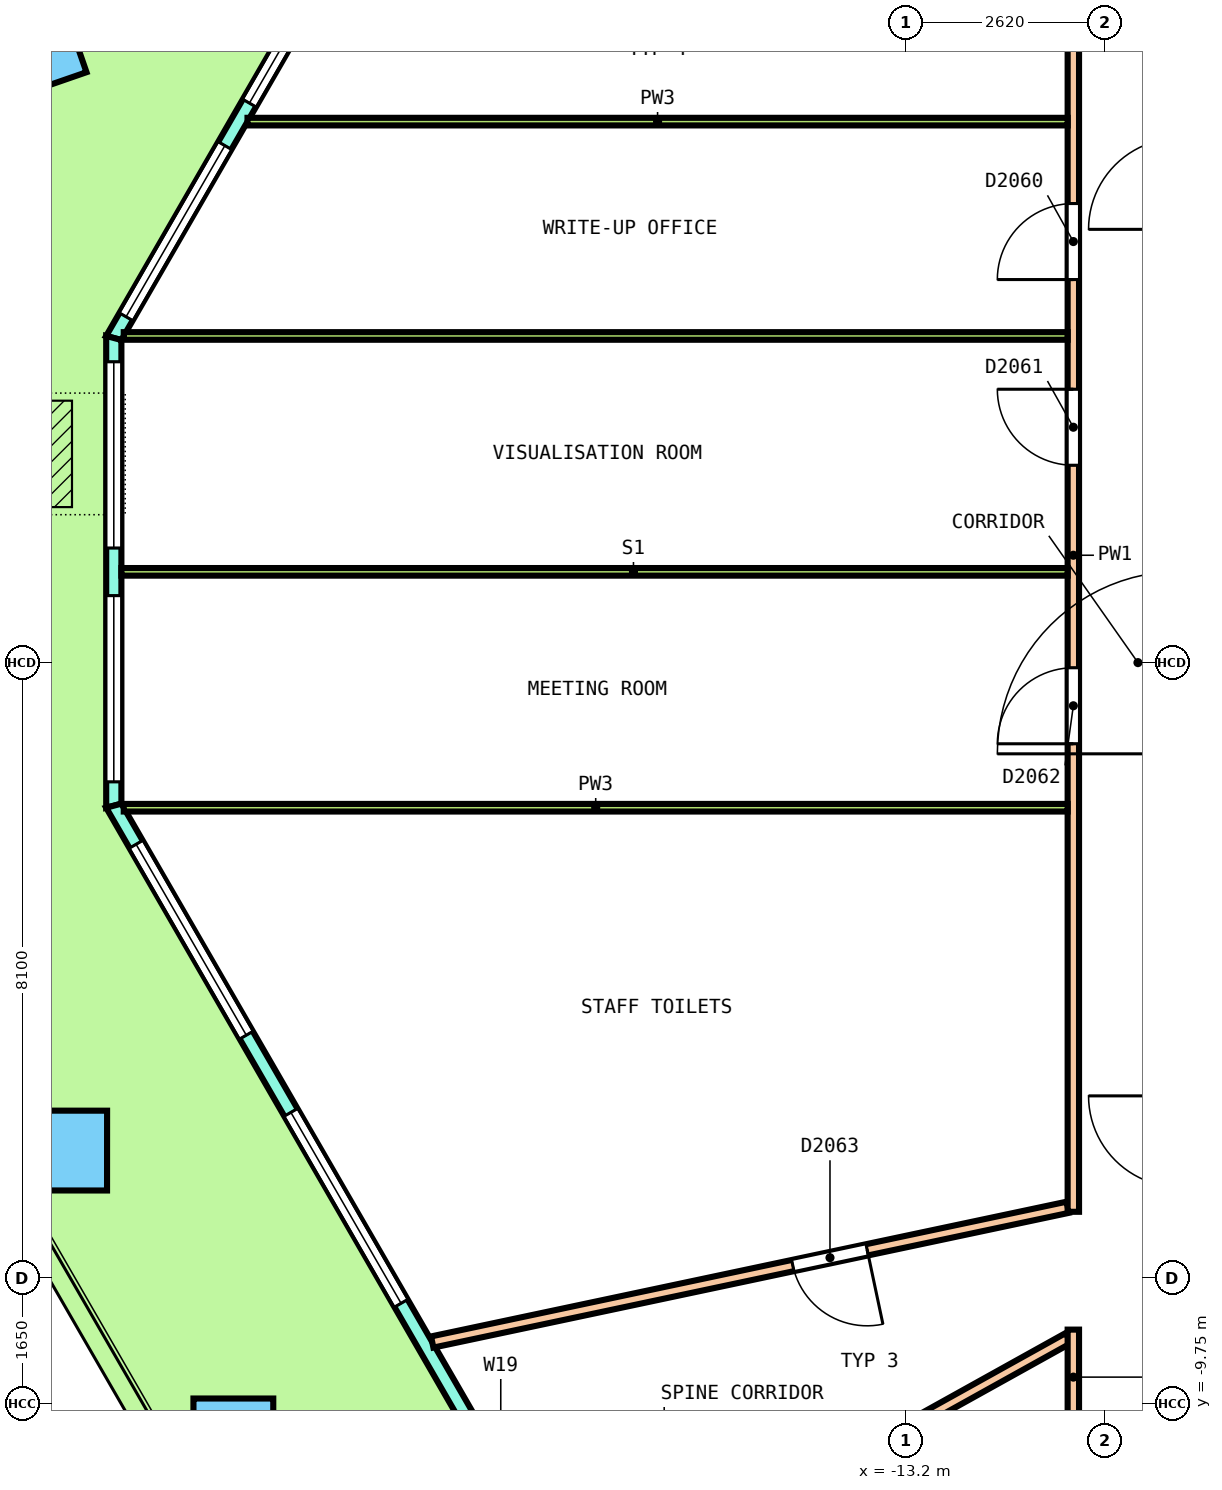
"""IFC4 building model, lengths in metres.
Left out: names, types, materials, properties, quantities, classifications, styles, units other than length and angle.
Written with IfcOpenShell. Run it as: python <this file> out.ifc"""

import sys

from ifc_helpers import new_model, si_unit, direction, frame, frame_2d, origin, origin_2d, place, context, subcontext, project, spatial, polyline, rectangle, outline, extrude, element, fill, save


model = new_model("IFC4")
c1 = context("Model", 3, precision=1e-05, world=origin(), true_north=direction((0.0, 1.0)))
c2 = subcontext(c1, "Body", "Model", "MODEL_VIEW")
j1 = project(units=[si_unit("LENGTHUNIT", "METRE"), si_unit("PLANEANGLEUNIT", "RADIAN")], contexts=[c1])
p1 = place(None, origin())
s1 = spatial("IfcSite", under=j1, at=p1, CompositionType="ELEMENT")
p2 = place(p1, origin())
s2 = spatial("IfcBuilding", under=s1, at=p2, CompositionType="ELEMENT")
p3 = place(p2, frame((0.0, 0.0, 249.4)))
s3 = spatial("IfcBuildingStorey", under=s2, at=p3, CompositionType="ELEMENT", Elevation=249.4)
p4 = place(p3, frame((-24.651, 8.091, 0.0), z_axis=(-0.02178538891, 0.025136987204, 0.999446611233), x_axis=(-0.499840729882, -0.866048916273, 0.010886660388)))
e1 = element("IfcColumn", 1, at=p4, inside=s3, PredefinedType="COLUMN", context=c2, shape_type="SweptSolid", body=[
    extrude(rectangle(XDim=1.05, YDim=1.05, at=origin_2d()), origin(), (0.0, 0.0, 1.0), 3.642),
])
p5 = place(p3, frame((-24.237, -6.419, 0.0), z_axis=(-0.010929666371, 0.018841940186, 0.999762733694), x_axis=(0.5010622412, -0.865137072574, 0.021782472348)))
e2 = element("IfcColumn", 2, at=p5, inside=s3, PredefinedType="COLUMN", context=c2, shape_type="SweptSolid", body=[
    extrude(rectangle(XDim=1.05, YDim=1.05, at=origin_2d()), origin(), (0.0, 0.0, 1.0), 3.641),
])
p6 = place(p3, frame((-22.051, -10.207, 0.0), z_axis=(-0.003611703602, 0.006287039604, 0.99997371402), x_axis=(0.497890396548, -0.867209652713, 0.007250604559)))
e3 = element("IfcColumn", 3, at=p6, inside=s3, PredefinedType="COLUMN", context=c2, shape_type="SweptSolid", body=[
    extrude(rectangle(XDim=1.05, YDim=1.05, at=origin_2d()), origin(), (0.0, 0.0, 1.0), 3.65),
])
p7 = place(p3, frame((-15.51, 18.323, 0.0), z_axis=(0.0, 0.0, 1.0), x_axis=(-0.499996823547, -0.866027237703, 0.0)))
e4 = element("IfcWall", 4, at=p7, inside=s3, PredefinedType="SOLIDWALL", context=c2, shape_type="SweptSolid", body=[
    extrude(outline(polyline([(-0.027, -0.1), (0.991, -0.1), (2.008, -0.1), (3.026, -0.1), (4.043, -0.1), (5.061, -0.1), (6.078, -0.1), (7.096, -0.1), (8.113, -0.1), (9.131, -0.1), (10.148, -0.1), (11.166, -0.1), (12.183, -0.1), (13.201, -0.1), (14.218, -0.1), (15.236, -0.1), (16.253, -0.1), (16.2, 0.1), (15.189, 0.1), (14.178, 0.1), (13.167, 0.1), (12.156, 0.1), (11.146, 0.1), (10.135, 0.1), (9.124, 0.1), (8.113, 0.1), (7.103, 0.1), (6.092, 0.1), (5.081, 0.1), (4.07, 0.1), (3.059, 0.1), (2.048, 0.1), (1.038, 0.1), (0.027, 0.1), (-0.027, -0.1)])), origin(), (0.0, 0.0, 1.0), 3.7),
])
p8 = place(p7, frame((0.323, 0.0, 0.1)))
e5 = element("IfcOpeningElement", 5, at=p8, cuts=e4, PredefinedType="OPENING", context=c2, shape_type="SweptSolid", body=[
    extrude(rectangle(XDim=2.6, YDim=2.65, at=frame_2d((1.3, 1.325))), frame((0.0, 0.11, 0.0), z_axis=(0.0, -1.0, 0.0), x_axis=(1.0, 0.0, 0.0)), (0.0, 0.0, 1.0), 0.22),
])
p9 = place(p7, frame((3.568, 0.0, 0.1)))
e6 = element("IfcOpeningElement", 6, at=p9, cuts=e4, PredefinedType="OPENING", context=c2, shape_type="SweptSolid", body=[
    extrude(rectangle(XDim=2.6, YDim=2.65, at=frame_2d((1.3, 1.325))), frame((0.0, 0.11, 0.0), z_axis=(0.0, -1.0, 0.0), x_axis=(1.0, 0.0, 0.0)), (0.0, 0.0, 1.0), 0.22),
])
p10 = place(p7, frame((7.213, 0.0, 0.0)))
e7 = element("IfcOpeningElement", 7, at=p10, cuts=e4, PredefinedType="OPENING", context=c2, shape_type="SweptSolid", body=[
    extrude(rectangle(XDim=1.8, YDim=2.4, at=frame_2d((0.9, 1.2))), frame((0.0, 0.11, 0.0), z_axis=(0.0, -1.0, 0.0), x_axis=(1.0, 0.0, 0.0)), (0.0, 0.0, 1.0), 0.22),
])
p11 = place(p7, frame((7.213, 0.0, 2.55)))
e8 = element("IfcOpeningElement", 8, at=p11, cuts=e4, PredefinedType="OPENING", context=c2, shape_type="SweptSolid", body=[
    extrude(rectangle(XDim=1.8, YDim=0.2, at=frame_2d((0.9, 0.1))), frame((0.0, 0.11, 0.0), z_axis=(0.0, -1.0, 0.0), x_axis=(1.0, 0.0, 0.0)), (0.0, 0.0, 1.0), 0.22),
])
p12 = place(p7, frame((10.059, 0.0, 0.1)))
e9 = element("IfcOpeningElement", 9, at=p12, cuts=e4, PredefinedType="OPENING", context=c2, shape_type="SweptSolid", body=[
    extrude(rectangle(XDim=2.6, YDim=2.65, at=frame_2d((1.3, 1.325))), frame((0.0, 0.11, 0.0), z_axis=(0.0, -1.0, 0.0), x_axis=(1.0, 0.0, 0.0)), (0.0, 0.0, 1.0), 0.22),
])
p13 = place(p7, frame((13.304, 0.0, 0.1)))
e10 = element("IfcOpeningElement", 10, at=p13, cuts=e4, PredefinedType="OPENING", context=c2, shape_type="SweptSolid", body=[
    extrude(rectangle(XDim=2.6, YDim=2.65, at=frame_2d((1.3, 1.325))), frame((0.0, 0.11, 0.0), z_axis=(0.0, -1.0, 0.0), x_axis=(1.0, 0.0, 0.0)), (0.0, 0.0, 1.0), 0.22),
])
p14 = place(p3, frame((-23.624, 4.271, 0.0), z_axis=(0.0, 0.0, 1.0), x_axis=(0.0, -1.0, 0.0)))
e11 = element("IfcWall", 11, at=p14, inside=s3, PredefinedType="SOLIDWALL", context=c2, shape_type="SweptSolid", body=[
    extrude(outline(polyline([(-0.027, -0.1), (1.008, -0.1), (2.042, -0.1), (3.077, -0.1), (4.111, -0.1), (5.146, -0.1), (6.18, -0.1), (6.126, 0.1), (5.11, 0.1), (4.093, 0.1), (3.077, 0.1), (2.06, 0.1), (1.043, 0.1), (0.027, 0.1), (-0.027, -0.1)])), origin(), (0.0, 0.0, 1.0), 3.7),
])
p15 = place(p14, frame((0.313, 0.0, 0.1)))
e12 = element("IfcOpeningElement", 12, at=p15, cuts=e11, PredefinedType="OPENING", context=c2, shape_type="SweptSolid", body=[
    extrude(rectangle(XDim=2.45, YDim=2.65, at=frame_2d((1.225, 1.325))), frame((0.0, 0.11, 0.0), z_axis=(0.0, -1.0, 0.0), x_axis=(1.0, 0.0, 0.0)), (0.0, 0.0, 1.0), 0.22),
])
p16 = place(p14, frame((3.39, 0.0, 0.1)))
e13 = element("IfcOpeningElement", 13, at=p16, cuts=e11, PredefinedType="OPENING", context=c2, shape_type="SweptSolid", body=[
    extrude(rectangle(XDim=2.45, YDim=2.65, at=frame_2d((1.225, 1.325))), frame((0.0, 0.11, 0.0), z_axis=(0.0, -1.0, 0.0), x_axis=(1.0, 0.0, 0.0)), (0.0, 0.0, 1.0), 0.22),
])
p17 = place(p3, frame((-23.624, -1.882, 0.0), z_axis=(0.0, 0.0, 1.0), x_axis=(0.50000612033, -0.866021870181, 0.0)))
e14 = element("IfcWall", 14, at=p17, inside=s3, PredefinedType="SOLIDWALL", context=c2, shape_type="SweptSolid", body=[
    extrude(outline(polyline([(-0.027, -0.1), (0.994, -0.1), (2.015, -0.1), (3.036, -0.1), (4.057, -0.1), (5.077, -0.1), (6.098, -0.1), (7.119, -0.1), (8.14, -0.1), (9.161, -0.1), (10.182, -0.1), (11.203, -0.1), (12.223, -0.1), (13.244, -0.1), (14.265, -0.1), (15.286, -0.1), (16.307, -0.1), (17.328, -0.1), (18.349, -0.1), (19.37, -0.1), (20.39, -0.1), (20.337, 0.1), (19.321, 0.1), (18.306, 0.1), (17.29, 0.1), (16.275, 0.1), (15.259, 0.1), (14.244, 0.1), (13.228, 0.1), (12.213, 0.1), (11.197, 0.1), (10.182, 0.1), (9.166, 0.1), (8.151, 0.1), (7.135, 0.1), (6.12, 0.1), (5.104, 0.1), (4.089, 0.1), (3.073, 0.1), (2.058, 0.1), (1.042, 0.1), (0.027, 0.1), (-0.027, -0.1)])), origin(), (0.0, 0.0, 1.0), 3.7),
])
p18 = place(p17, frame((0.586, 0.0, 0.1)))
e15 = element("IfcOpeningElement", 15, at=p18, cuts=e14, PredefinedType="OPENING", context=c2, shape_type="SweptSolid", body=[
    extrude(rectangle(XDim=2.9, YDim=2.65, at=frame_2d((1.45, 1.325))), frame((0.0, 0.11, 0.0), z_axis=(0.0, -1.0, 0.0), x_axis=(1.0, 0.0, 0.0)), (0.0, 0.0, 1.0), 0.22),
])
p19 = place(p17, frame((4.659, 0.0, 0.1)))
e16 = element("IfcOpeningElement", 16, at=p19, cuts=e14, PredefinedType="OPENING", context=c2, shape_type="SweptSolid", body=[
    extrude(rectangle(XDim=2.9, YDim=2.65, at=frame_2d((1.45, 1.325))), frame((0.0, 0.11, 0.0), z_axis=(0.0, -1.0, 0.0), x_axis=(1.0, 0.0, 0.0)), (0.0, 0.0, 1.0), 0.22),
])
p20 = place(p17, frame((9.282, 0.0, 0.0)))
e17 = element("IfcOpeningElement", 17, at=p20, cuts=e14, PredefinedType="OPENING", context=c2, shape_type="SweptSolid", body=[
    extrude(rectangle(XDim=1.8, YDim=2.4, at=frame_2d((0.9, 1.2))), frame((0.0, 0.11, 0.0), z_axis=(0.0, -1.0, 0.0), x_axis=(1.0, 0.0, 0.0)), (0.0, 0.0, 1.0), 0.22),
])
p21 = place(p17, frame((9.282, 0.0, 2.55)))
e18 = element("IfcOpeningElement", 18, at=p21, cuts=e14, PredefinedType="OPENING", context=c2, shape_type="SweptSolid", body=[
    extrude(rectangle(XDim=1.8, YDim=0.2, at=frame_2d((0.9, 0.1))), frame((0.0, 0.11, 0.0), z_axis=(0.0, -1.0, 0.0), x_axis=(1.0, 0.0, 0.0)), (0.0, 0.0, 1.0), 0.22),
])
p22 = place(p17, frame((12.805, 0.0, 0.1)))
e19 = element("IfcOpeningElement", 19, at=p22, cuts=e14, PredefinedType="OPENING", context=c2, shape_type="SweptSolid", body=[
    extrude(rectangle(XDim=2.9, YDim=2.65, at=frame_2d((1.45, 1.325))), frame((0.0, 0.11, 0.0), z_axis=(0.0, -1.0, 0.0), x_axis=(1.0, 0.0, 0.0)), (0.0, 0.0, 1.0), 0.22),
])
p23 = place(p17, frame((16.877, 0.0, 0.1)))
e20 = element("IfcOpeningElement", 20, at=p23, cuts=e14, PredefinedType="OPENING", context=c2, shape_type="SweptSolid", body=[
    extrude(rectangle(XDim=2.9, YDim=2.65, at=frame_2d((1.45, 1.325))), frame((0.0, 0.11, 0.0), z_axis=(0.0, -1.0, 0.0), x_axis=(1.0, 0.0, 0.0)), (0.0, 0.0, 1.0), 0.22),
])
p24 = place(p3, frame((-19.435, -8.938, 0.0), z_axis=(0.0, 0.0, 1.0), x_axis=(0.978255730957, 0.207402326048, 0.0)))
e21 = element("IfcWall", 21, at=p24, inside=s3, PredefinedType="PARTITIONING", context=c2, shape_type="SweptSolid", body=[
    extrude(rectangle(XDim=8.547, YDim=0.15, at=frame_2d((4.273, 0.0))), origin(), (0.0, 0.0, 1.0), 2.8),
])
p25 = place(p24, frame((4.849, 0.0, 0.0)))
e22 = element("IfcOpeningElement", 22, at=p25, cuts=e21, PredefinedType="OPENING", context=c2, shape_type="SweptSolid", body=[
    extrude(rectangle(XDim=1.0, YDim=2.1, at=frame_2d((0.5, 1.05))), frame((0.0, 0.085, 0.0), z_axis=(0.0, -1.0, 0.0), x_axis=(1.0, 0.0, 0.0)), (0.0, 0.0, 1.0), 0.17),
])
p26 = place(p3, frame((-17.424, -12.421, 0.0), z_axis=(0.0, 0.0, 1.0), x_axis=(0.874033768058, 0.485865179134, 0.0)))
e23 = element("IfcWall", 23, at=p26, inside=s3, PredefinedType="PARTITIONING", context=c2, shape_type="SweptSolid", body=[
    extrude(rectangle(XDim=7.274, YDim=0.15, at=frame_2d((3.637, 0.0))), origin(), (0.0, 0.0, 1.0), 2.8),
])
p27 = place(p26, frame((1.762, 0.0, 0.0)))
e24 = element("IfcOpeningElement", 24, at=p27, cuts=e23, PredefinedType="OPENING", context=c2, shape_type="SweptSolid", body=[
    extrude(rectangle(XDim=1.0, YDim=2.1, at=frame_2d((0.5, 1.05))), frame((0.0, 0.085, 0.0), z_axis=(0.0, -1.0, 0.0), x_axis=(1.0, 0.0, 0.0)), (0.0, 0.0, 1.0), 0.17),
])
p28 = place(p3, frame((-11.0, -10.025, 0.0), z_axis=(0.0, 0.0, 1.0), x_axis=(0.0, 1.0, 0.0)))
e25 = element("IfcWall", 25, at=p28, inside=s3, PredefinedType="PARTITIONING", context=c2, shape_type="SweptSolid", body=[
    extrude(rectangle(XDim=1.25, YDim=0.15, at=frame_2d((0.625, 0.0))), origin(), (0.0, 0.0, 1.0), 3.7),
])
p29 = place(p3, frame((-11.0, -7.225, 0.0), z_axis=(0.0, 0.0, 1.0), x_axis=(0.0, 1.0, 0.0)))
e26 = element("IfcWall", 26, at=p29, inside=s3, PredefinedType="PARTITIONING", context=c2, shape_type="SweptSolid", body=[
    extrude(rectangle(XDim=17.275, YDim=0.15, at=frame_2d((8.638, 0.0))), origin(), (0.0, 0.0, 1.0), 2.8),
])
p30 = place(p29, frame((15.654, 0.0, 0.0)))
e27 = element("IfcOpeningElement", 27, at=p30, cuts=e26, PredefinedType="OPENING", context=c2, shape_type="SweptSolid", body=[
    extrude(rectangle(XDim=1.0, YDim=2.1, at=frame_2d((0.5, 1.05))), frame((0.0, 0.085, 0.0), z_axis=(0.0, -1.0, 0.0), x_axis=(1.0, 0.0, 0.0)), (0.0, 0.0, 1.0), 0.17),
])
p31 = place(p29, frame((12.264, 0.0, 0.0)))
e28 = element("IfcOpeningElement", 28, at=p31, cuts=e26, PredefinedType="OPENING", context=c2, shape_type="SweptSolid", body=[
    extrude(rectangle(XDim=1.0, YDim=2.1, at=frame_2d((0.5, 1.05))), frame((0.0, 0.085, 0.0), z_axis=(0.0, -1.0, 0.0), x_axis=(1.0, 0.0, 0.0)), (0.0, 0.0, 1.0), 0.17),
])
p32 = place(p29, frame((9.822, 0.0, 0.0)))
e29 = element("IfcOpeningElement", 29, at=p32, cuts=e26, PredefinedType="OPENING", context=c2, shape_type="SweptSolid", body=[
    extrude(rectangle(XDim=1.0, YDim=2.1, at=frame_2d((0.5, 1.05))), frame((0.0, 0.085, 0.0), z_axis=(0.0, -1.0, 0.0), x_axis=(1.0, 0.0, 0.0)), (0.0, 0.0, 1.0), 0.17),
])
p33 = place(p29, frame((6.157, 0.0, 0.0)))
e30 = element("IfcOpeningElement", 30, at=p33, cuts=e26, PredefinedType="OPENING", context=c2, shape_type="SweptSolid", body=[
    extrude(rectangle(XDim=1.0, YDim=2.1, at=frame_2d((0.5, 1.05))), frame((0.0, 0.085, 0.0), z_axis=(0.0, -1.0, 0.0), x_axis=(1.0, 0.0, 0.0)), (0.0, 0.0, 1.0), 0.17),
])
p34 = place(p3, frame((-21.865, 7.117, 0.0), z_axis=(0.0, 0.0, 1.0), x_axis=(1.0, 0.0, 0.0)))
e31 = element("IfcWall", 31, at=p34, inside=s3, PredefinedType="PARTITIONING", context=c2, shape_type="SweptSolid", body=[
    extrude(rectangle(XDim=10.79, YDim=0.1, at=frame_2d((5.395, 0.0))), origin(), (0.0, 0.0, 1.0), 2.8),
])
p35 = place(p3, frame((-23.493, 4.298, 0.0), z_axis=(0.0, 0.0, 1.0), x_axis=(1.0, 0.0, 0.0)))
e32 = element("IfcWall", 32, at=p35, inside=s3, PredefinedType="PARTITIONING", context=c2, shape_type="SweptSolid", body=[
    extrude(rectangle(XDim=12.418, YDim=0.1, at=frame_2d((6.209, 0.0))), origin(), (0.0, 0.0, 1.0), 2.8),
])
p36 = place(p3, frame((-23.524, 1.194, 0.0), z_axis=(0.0, 0.0, 1.0), x_axis=(1.0, 0.0, 0.0)))
e33 = element("IfcWall", 33, at=p36, inside=s3, PredefinedType="PARTITIONING", context=c2, shape_type="SweptSolid", body=[
    extrude(rectangle(XDim=12.449, YDim=0.1, at=frame_2d((6.225, 0.0))), origin(), (0.0, 0.0, 1.0), 2.8),
])
p37 = place(p3, frame((-23.493, -1.909, 0.0), z_axis=(0.0, 0.0, 1.0), x_axis=(1.0, 0.0, 0.0)))
e34 = element("IfcWall", 34, at=p37, inside=s3, PredefinedType="PARTITIONING", context=c2, shape_type="SweptSolid", body=[
    extrude(rectangle(XDim=12.418, YDim=0.1, at=frame_2d((6.209, 0.0))), origin(), (0.0, 0.0, 1.0), 2.8),
])
p38 = place(p12, origin())
e35 = element("IfcWindow", 35, at=p38, inside=s3, PartitioningType="SINGLE_PANEL", PredefinedType="WINDOW", context=c2, shape_type="SweptSolid", body=[
    extrude(rectangle(XDim=2.6, YDim=2.65, at=frame_2d((1.3, 1.325))), frame((0.0, 0.03, 0.0), z_axis=(0.0, -1.0, 0.0), x_axis=(1.0, 0.0, 0.0)), (0.0, 0.0, 1.0), 0.06),
])
fill(e9, e35)
p39 = place(p13, origin())
e36 = element("IfcWindow", 36, at=p39, inside=s3, PartitioningType="SINGLE_PANEL", PredefinedType="WINDOW", context=c2, shape_type="SweptSolid", body=[
    extrude(rectangle(XDim=2.6, YDim=2.65, at=frame_2d((1.3, 1.325))), frame((0.0, 0.03, 0.0), z_axis=(0.0, -1.0, 0.0), x_axis=(1.0, 0.0, 0.0)), (0.0, 0.0, 1.0), 0.06),
])
fill(e10, e36)
p40 = place(p15, origin())
e37 = element("IfcWindow", 37, at=p40, inside=s3, PartitioningType="SINGLE_PANEL", PredefinedType="WINDOW", context=c2, shape_type="SweptSolid", body=[
    extrude(rectangle(XDim=2.45, YDim=2.65, at=frame_2d((1.225, 1.325))), frame((0.0, 0.03, 0.0), z_axis=(0.0, -1.0, 0.0), x_axis=(1.0, 0.0, 0.0)), (0.0, 0.0, 1.0), 0.06),
])
fill(e12, e37)
p41 = place(p16, origin())
e38 = element("IfcWindow", 38, at=p41, inside=s3, PartitioningType="SINGLE_PANEL", PredefinedType="WINDOW", context=c2, shape_type="SweptSolid", body=[
    extrude(rectangle(XDim=2.45, YDim=2.65, at=frame_2d((1.225, 1.325))), frame((0.0, 0.03, 0.0), z_axis=(0.0, -1.0, 0.0), x_axis=(1.0, 0.0, 0.0)), (0.0, 0.0, 1.0), 0.06),
])
fill(e13, e38)
p42 = place(p18, origin())
e39 = element("IfcWindow", 39, at=p42, inside=s3, PartitioningType="SINGLE_PANEL", PredefinedType="WINDOW", context=c2, shape_type="SweptSolid", body=[
    extrude(rectangle(XDim=2.9, YDim=2.65, at=frame_2d((1.45, 1.325))), frame((0.0, 0.03, 0.0), z_axis=(0.0, -1.0, 0.0), x_axis=(1.0, 0.0, 0.0)), (0.0, 0.0, 1.0), 0.06),
])
fill(e15, e39)
p43 = place(p19, origin())
e40 = element("IfcWindow", 40, at=p43, inside=s3, PartitioningType="SINGLE_PANEL", PredefinedType="WINDOW", context=c2, shape_type="SweptSolid", body=[
    extrude(rectangle(XDim=2.9, YDim=2.65, at=frame_2d((1.45, 1.325))), frame((0.0, 0.03, 0.0), z_axis=(0.0, -1.0, 0.0), x_axis=(1.0, 0.0, 0.0)), (0.0, 0.0, 1.0), 0.06),
])
fill(e16, e40)
p44 = place(p31, origin())
e41 = element("IfcDoor", 41, at=p44, inside=s3, OperationType="SINGLE_SWING_RIGHT", PredefinedType="DOOR", context=c2, shape_type="SweptSolid", body=[
    extrude(rectangle(XDim=1.0, YDim=2.1, at=frame_2d((0.5, 1.05))), frame((0.0, 0.025, 0.0), z_axis=(0.0, -1.0, 0.0), x_axis=(1.0, 0.0, 0.0)), (0.0, 0.0, 1.0), 0.05),
])
fill(e28, e41)
p45 = place(p32, origin())
e42 = element("IfcDoor", 42, at=p45, inside=s3, OperationType="SINGLE_SWING_RIGHT", PredefinedType="DOOR", context=c2, shape_type="SweptSolid", body=[
    extrude(rectangle(XDim=1.0, YDim=2.1, at=frame_2d((0.5, 1.05))), frame((0.0, 0.025, 0.0), z_axis=(0.0, -1.0, 0.0), x_axis=(1.0, 0.0, 0.0)), (0.0, 0.0, 1.0), 0.05),
])
fill(e29, e42)
p46 = place(p33, origin())
e43 = element("IfcDoor", 43, at=p46, inside=s3, OperationType="SINGLE_SWING_RIGHT", PredefinedType="DOOR", context=c2, shape_type="SweptSolid", body=[
    extrude(rectangle(XDim=1.0, YDim=2.1, at=frame_2d((0.5, 1.05))), frame((0.0, 0.025, 0.0), z_axis=(0.0, -1.0, 0.0), x_axis=(1.0, 0.0, 0.0)), (0.0, 0.0, 1.0), 0.05),
])
fill(e30, e43)
p47 = place(p25, origin())
e44 = element("IfcDoor", 44, at=p47, inside=s3, OperationType="SINGLE_SWING_RIGHT", PredefinedType="DOOR", context=c2, shape_type="SweptSolid", body=[
    extrude(rectangle(XDim=1.0, YDim=2.1, at=frame_2d((0.5, 1.05))), frame((0.0, 0.025, 0.0), z_axis=(0.0, -1.0, 0.0), x_axis=(1.0, 0.0, 0.0)), (0.0, 0.0, 1.0), 0.05),
])
fill(e22, e44)
save(model, sys.argv[1])
